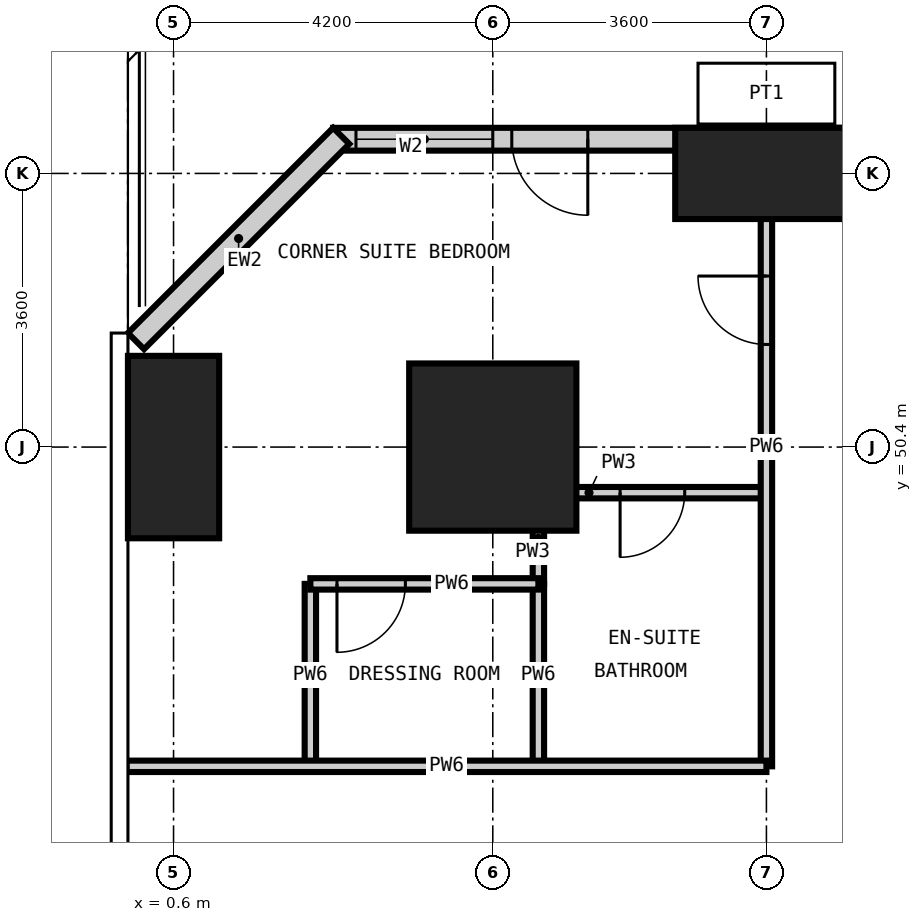
"""IFC4 building model, lengths in metres.
Left out: names, types, materials, properties, quantities, classifications, styles, units other than length and angle.
Written with IfcOpenShell. Run it as: python <this file> out.ifc"""

import sys

from ifc_helpers import new_model, si_unit, direction, frame, frame_2d, origin, origin_2d, place, context, subcontext, project, spatial, rectangle, extrude, element, fill, save


model = new_model("IFC4")
c1 = context("Model", 3, precision=1e-05, world=origin(), true_north=direction((0.0, 1.0)))
c2 = subcontext(c1, "Body", "Model", "MODEL_VIEW")
j1 = project(units=[si_unit("LENGTHUNIT", "METRE"), si_unit("PLANEANGLEUNIT", "RADIAN")], contexts=[c1])
p1 = place(None, origin())
s1 = spatial("IfcSite", under=j1, at=p1, CompositionType="ELEMENT")
p2 = place(p1, origin())
s2 = spatial("IfcBuilding", under=s1, at=p2, CompositionType="ELEMENT")
p3 = place(p2, frame((0.0, 0.0, 93.6)))
s3 = spatial("IfcBuildingStorey", under=s2, at=p3, CompositionType="ELEMENT", Elevation=93.6)
p4 = place(p3, frame((0.6, 50.4, -0.35), z_axis=(0.0, 0.0, 1.0), x_axis=(1.0, 0.0, 0.0)))
e1 = element("IfcColumn", 1, at=p4, inside=s3, PredefinedType="COLUMN", context=c2, shape_type="SweptSolid", body=[
    extrude(rectangle(XDim=1.2, YDim=2.4, at=origin_2d()), origin(), (0.0, 0.0, 1.0), 3.6),
])
p5 = place(p3, frame((4.8, 50.4, -0.35), z_axis=(0.0, 0.0, 1.0), x_axis=(1.0, 0.0, 0.0)))
e2 = element("IfcColumn", 2, at=p5, inside=s3, PredefinedType="COLUMN", context=c2, shape_type="SweptSolid", body=[
    extrude(rectangle(XDim=2.2, YDim=2.2, at=origin_2d()), origin(), (0.0, 0.0, 1.0), 3.6),
])
p6 = place(p3, frame((8.4, 54.0, -0.35), z_axis=(0.0, 0.0, 1.0), x_axis=(1.0, 0.0, 0.0)))
e3 = element("IfcColumn", 3, at=p6, inside=s3, PredefinedType="COLUMN", context=c2, shape_type="SweptSolid", body=[
    extrude(rectangle(XDim=2.4, YDim=1.2, at=origin_2d()), origin(), (0.0, 0.0, 1.0), 3.6),
])
p7 = place(p3, frame((51.9, 54.45, 0.0), z_axis=(0.0, 0.0, 1.0), x_axis=(-1.0, 0.0, 0.0)))
e4 = element("IfcWall", 4, at=p7, inside=s3, PredefinedType="SOLIDWALL", context=c2, shape_type="SweptSolid", body=[
    extrude(rectangle(XDim=49.2, YDim=0.3, at=frame_2d((24.6, 0.0))), origin(), (0.0, 0.0, 1.0), 3.25),
])
p8 = place(p7, frame((45.85, 0.0, 0.0)))
e5 = element("IfcOpeningElement", 5, at=p8, cuts=e4, PredefinedType="OPENING", context=c2, shape_type="SweptSolid", body=[
    extrude(rectangle(XDim=1.0, YDim=2.4, at=frame_2d((0.5, 1.2))), frame((0.0, 0.16, 0.0), z_axis=(0.0, -1.0, 0.0), x_axis=(1.0, 0.0, 0.0)), (0.0, 0.0, 1.0), 0.32),
])
p9 = place(p7, frame((47.1, 0.0, 0.6)))
e6 = element("IfcOpeningElement", 6, at=p9, cuts=e4, PredefinedType="OPENING", context=c2, shape_type="SweptSolid", body=[
    extrude(rectangle(XDim=1.8, YDim=2.1, at=frame_2d((0.9, 1.05))), frame((0.0, 0.16, 0.0), z_axis=(0.0, -1.0, 0.0), x_axis=(1.0, 0.0, 0.0)), (0.0, 0.0, 1.0), 0.32),
])
p10 = place(p7, frame((38.8, 0.0, 0.0)))
e7 = element("IfcOpeningElement", 7, at=p10, cuts=e4, PredefinedType="OPENING", context=c2, shape_type="SweptSolid", body=[
    extrude(rectangle(XDim=1.0, YDim=2.4, at=frame_2d((0.5, 1.2))), frame((0.0, 0.16, 0.0), z_axis=(0.0, -1.0, 0.0), x_axis=(1.0, 0.0, 0.0)), (0.0, 0.0, 1.0), 0.32),
])
p11 = place(p7, frame((40.4, 0.0, 0.6)))
e8 = element("IfcOpeningElement", 8, at=p11, cuts=e4, PredefinedType="OPENING", context=c2, shape_type="SweptSolid", body=[
    extrude(rectangle(XDim=1.8, YDim=2.1, at=frame_2d((0.9, 1.05))), frame((0.0, 0.16, 0.0), z_axis=(0.0, -1.0, 0.0), x_axis=(1.0, 0.0, 0.0)), (0.0, 0.0, 1.0), 0.32),
])
p12 = place(p7, frame((36.7, 0.0, 0.6)))
e9 = element("IfcOpeningElement", 9, at=p12, cuts=e4, PredefinedType="OPENING", context=c2, shape_type="SweptSolid", body=[
    extrude(rectangle(XDim=1.8, YDim=2.1, at=frame_2d((0.9, 1.05))), frame((0.0, 0.16, 0.0), z_axis=(0.0, -1.0, 0.0), x_axis=(1.0, 0.0, 0.0)), (0.0, 0.0, 1.0), 0.32),
])
p13 = place(p7, frame((30.4, 0.0, 0.0)))
e10 = element("IfcOpeningElement", 10, at=p13, cuts=e4, PredefinedType="OPENING", context=c2, shape_type="SweptSolid", body=[
    extrude(rectangle(XDim=1.0, YDim=2.4, at=frame_2d((0.5, 1.2))), frame((0.0, 0.16, 0.0), z_axis=(0.0, -1.0, 0.0), x_axis=(1.0, 0.0, 0.0)), (0.0, 0.0, 1.0), 0.32),
])
p14 = place(p7, frame((31.7, 0.0, 0.6)))
e11 = element("IfcOpeningElement", 11, at=p14, cuts=e4, PredefinedType="OPENING", context=c2, shape_type="SweptSolid", body=[
    extrude(rectangle(XDim=1.8, YDim=2.1, at=frame_2d((0.9, 1.05))), frame((0.0, 0.16, 0.0), z_axis=(0.0, -1.0, 0.0), x_axis=(1.0, 0.0, 0.0)), (0.0, 0.0, 1.0), 0.32),
])
p15 = place(p7, frame((28.0, 0.0, 0.6)))
e12 = element("IfcOpeningElement", 12, at=p15, cuts=e4, PredefinedType="OPENING", context=c2, shape_type="SweptSolid", body=[
    extrude(rectangle(XDim=1.8, YDim=2.1, at=frame_2d((0.9, 1.05))), frame((0.0, 0.16, 0.0), z_axis=(0.0, -1.0, 0.0), x_axis=(1.0, 0.0, 0.0)), (0.0, 0.0, 1.0), 0.32),
])
p16 = place(p7, frame((22.0, 0.0, 0.0)))
e13 = element("IfcOpeningElement", 13, at=p16, cuts=e4, PredefinedType="OPENING", context=c2, shape_type="SweptSolid", body=[
    extrude(rectangle(XDim=1.0, YDim=2.4, at=frame_2d((0.5, 1.2))), frame((0.0, 0.16, 0.0), z_axis=(0.0, -1.0, 0.0), x_axis=(1.0, 0.0, 0.0)), (0.0, 0.0, 1.0), 0.32),
])
p17 = place(p7, frame((23.6, 0.0, 0.6)))
e14 = element("IfcOpeningElement", 14, at=p17, cuts=e4, PredefinedType="OPENING", context=c2, shape_type="SweptSolid", body=[
    extrude(rectangle(XDim=1.8, YDim=2.1, at=frame_2d((0.9, 1.05))), frame((0.0, 0.16, 0.0), z_axis=(0.0, -1.0, 0.0), x_axis=(1.0, 0.0, 0.0)), (0.0, 0.0, 1.0), 0.32),
])
p18 = place(p7, frame((19.6, 0.0, 0.6)))
e15 = element("IfcOpeningElement", 15, at=p18, cuts=e4, PredefinedType="OPENING", context=c2, shape_type="SweptSolid", body=[
    extrude(rectangle(XDim=1.8, YDim=2.1, at=frame_2d((0.9, 1.05))), frame((0.0, 0.16, 0.0), z_axis=(0.0, -1.0, 0.0), x_axis=(1.0, 0.0, 0.0)), (0.0, 0.0, 1.0), 0.32),
])
p19 = place(p7, frame((13.6, 0.0, 0.0)))
e16 = element("IfcOpeningElement", 16, at=p19, cuts=e4, PredefinedType="OPENING", context=c2, shape_type="SweptSolid", body=[
    extrude(rectangle(XDim=1.0, YDim=2.4, at=frame_2d((0.5, 1.2))), frame((0.0, 0.16, 0.0), z_axis=(0.0, -1.0, 0.0), x_axis=(1.0, 0.0, 0.0)), (0.0, 0.0, 1.0), 0.32),
])
p20 = place(p7, frame((15.2, 0.0, 0.6)))
e17 = element("IfcOpeningElement", 17, at=p20, cuts=e4, PredefinedType="OPENING", context=c2, shape_type="SweptSolid", body=[
    extrude(rectangle(XDim=1.8, YDim=2.1, at=frame_2d((0.9, 1.05))), frame((0.0, 0.16, 0.0), z_axis=(0.0, -1.0, 0.0), x_axis=(1.0, 0.0, 0.0)), (0.0, 0.0, 1.0), 0.32),
])
p21 = place(p7, frame((11.5, 0.0, 0.6)))
e18 = element("IfcOpeningElement", 18, at=p21, cuts=e4, PredefinedType="OPENING", context=c2, shape_type="SweptSolid", body=[
    extrude(rectangle(XDim=1.8, YDim=2.1, at=frame_2d((0.9, 1.05))), frame((0.0, 0.16, 0.0), z_axis=(0.0, -1.0, 0.0), x_axis=(1.0, 0.0, 0.0)), (0.0, 0.0, 1.0), 0.32),
])
p22 = place(p7, frame((7.3, 0.0, 0.0)))
e19 = element("IfcOpeningElement", 19, at=p22, cuts=e4, PredefinedType="OPENING", context=c2, shape_type="SweptSolid", body=[
    extrude(rectangle(XDim=1.0, YDim=2.4, at=frame_2d((0.5, 1.2))), frame((0.0, 0.16, 0.0), z_axis=(0.0, -1.0, 0.0), x_axis=(1.0, 0.0, 0.0)), (0.0, 0.0, 1.0), 0.32),
])
p23 = place(p7, frame((2.75, 0.0, 0.0)))
e20 = element("IfcOpeningElement", 20, at=p23, cuts=e4, PredefinedType="OPENING", context=c2, shape_type="SweptSolid", body=[
    extrude(rectangle(XDim=1.0, YDim=2.4, at=frame_2d((0.5, 1.2))), frame((0.0, 0.16, 0.0), z_axis=(0.0, -1.0, 0.0), x_axis=(1.0, 0.0, 0.0)), (0.0, 0.0, 1.0), 0.32),
])
p24 = place(p3, frame((2.806, 54.494, 0.0), z_axis=(0.0, 0.0, 1.0), x_axis=(-0.707106781187, -0.707106781187, 0.0)))
e21 = element("IfcWall", 21, at=p24, inside=s3, PredefinedType="SOLIDWALL", context=c2, shape_type="SweptSolid", body=[
    extrude(rectangle(XDim=3.818, YDim=0.3, at=frame_2d((1.909, 0.0))), origin(), (0.0, 0.0, 1.0), 3.25),
])
p25 = place(p3, frame((5.4, 48.6, 0.0), z_axis=(0.0, 0.0, 1.0), x_axis=(0.0, 1.0, 0.0)))
e22 = element("IfcWall", 22, at=p25, inside=s3, PredefinedType="PARTITIONING", context=c2, shape_type="SweptSolid", body=[
    extrude(rectangle(XDim=1.2, YDim=0.15, at=frame_2d((0.6, 0.0))), origin(), (0.0, 0.0, 1.0), 3.25),
])
p26 = place(p3, frame((5.4, 49.8, 0.0), z_axis=(0.0, 0.0, 1.0), x_axis=(1.0, 0.0, 0.0)))
e23 = element("IfcWall", 23, at=p26, inside=s3, PredefinedType="PARTITIONING", context=c2, shape_type="SweptSolid", body=[
    extrude(rectangle(XDim=3.0, YDim=0.15, at=frame_2d((1.5, 0.0))), origin(), (0.0, 0.0, 1.0), 3.25),
])
p27 = place(p26, frame((1.075, 0.0, 0.0)))
e24 = element("IfcOpeningElement", 24, at=p27, cuts=e23, PredefinedType="OPENING", context=c2, shape_type="SweptSolid", body=[
    extrude(rectangle(XDim=0.85, YDim=2.1, at=frame_2d((0.425, 1.05))), frame((0.0, 0.085, 0.0), z_axis=(0.0, -1.0, 0.0), x_axis=(1.0, 0.0, 0.0)), (0.0, 0.0, 1.0), 0.17),
])
for number, where, z_axis, x_axis in (
    (25, (2.4, 46.2, 0.0), (0.0, 0.0, 1.0), (0.0, 1.0, 0.0)),
    (26, (5.4, 46.2, 0.0), (0.0, 0.0, 1.0), (0.0, 1.0, 0.0)),
):
    element("IfcWall", number, at=place(p3, frame(where, z_axis=z_axis, x_axis=x_axis)), inside=s3, PredefinedType="PARTITIONING", context=c2, shape_type="SweptSolid", body=[
        extrude(rectangle(XDim=2.4, YDim=0.15, at=frame_2d((1.2, 0.0))), origin(), (0.0, 0.0, 1.0), 3.25),
    ])
p28 = place(p3, frame((8.4, 46.2, 0.0), z_axis=(0.0, 0.0, 1.0), x_axis=(0.0, 1.0, 0.0)))
e27 = element("IfcWall", 27, at=p28, inside=s3, PredefinedType="PARTITIONING", context=c2, shape_type="SweptSolid", body=[
    extrude(rectangle(XDim=8.4, YDim=0.15, at=frame_2d((4.2, 0.0))), origin(), (0.0, 0.0, 1.0), 3.25),
])
p29 = place(p28, frame((5.55, 0.0, 0.0)))
e28 = element("IfcOpeningElement", 28, at=p29, cuts=e27, PredefinedType="OPENING", context=c2, shape_type="SweptSolid", body=[
    extrude(rectangle(XDim=0.9, YDim=2.1, at=frame_2d((0.45, 1.05))), frame((0.0, 0.085, 0.0), z_axis=(0.0, -1.0, 0.0), x_axis=(1.0, 0.0, 0.0)), (0.0, 0.0, 1.0), 0.17),
])
p30 = place(p3, frame((-0.018, 46.2, 0.0), z_axis=(0.0, 0.0, 1.0), x_axis=(1.0, 0.0, 0.0)))
e29 = element("IfcWall", 29, at=p30, inside=s3, PredefinedType="PARTITIONING", context=c2, shape_type="SweptSolid", body=[
    extrude(rectangle(XDim=8.418, YDim=0.15, at=frame_2d((4.209, 0.0))), origin(), (0.0, 0.0, 1.0), 3.25),
])
p31 = place(p3, frame((2.4, 48.6, 0.0), z_axis=(0.0, 0.0, 1.0), x_axis=(1.0, 0.0, 0.0)))
e30 = element("IfcWall", 30, at=p31, inside=s3, PredefinedType="PARTITIONING", context=c2, shape_type="SweptSolid", body=[
    extrude(rectangle(XDim=3.0, YDim=0.15, at=frame_2d((1.5, 0.0))), origin(), (0.0, 0.0, 1.0), 3.25),
])
p32 = place(p31, frame((0.35, 0.0, 0.0)))
e31 = element("IfcOpeningElement", 31, at=p32, cuts=e30, PredefinedType="OPENING", context=c2, shape_type="SweptSolid", body=[
    extrude(rectangle(XDim=0.9, YDim=2.1, at=frame_2d((0.45, 1.05))), frame((0.0, 0.085, 0.0), z_axis=(0.0, -1.0, 0.0), x_axis=(1.0, 0.0, 0.0)), (0.0, 0.0, 1.0), 0.17),
])
p33 = place(p8, origin())
e32 = element("IfcDoor", 32, at=p33, inside=s3, OperationType="SINGLE_SWING_LEFT", PredefinedType="DOOR", context=c2, shape_type="SweptSolid", body=[
    extrude(rectangle(XDim=1.0, YDim=2.4, at=frame_2d((0.5, 1.2))), frame((0.0, 0.025, 0.0), z_axis=(0.0, -1.0, 0.0), x_axis=(1.0, 0.0, 0.0)), (0.0, 0.0, 1.0), 0.05),
])
fill(e5, e32)
p34 = place(p9, origin())
e33 = element("IfcWindow", 33, at=p34, inside=s3, PartitioningType="SINGLE_PANEL", PredefinedType="WINDOW", context=c2, shape_type="SweptSolid", body=[
    extrude(rectangle(XDim=1.8, YDim=2.1, at=frame_2d((0.9, 1.05))), frame((0.0, 0.03, 0.0), z_axis=(0.0, -1.0, 0.0), x_axis=(1.0, 0.0, 0.0)), (0.0, 0.0, 1.0), 0.06),
])
fill(e6, e33)
p35 = place(p29, origin())
e34 = element("IfcDoor", 34, at=p35, inside=s3, OperationType="SINGLE_SWING_RIGHT", PredefinedType="DOOR", context=c2, shape_type="SweptSolid", body=[
    extrude(rectangle(XDim=0.9, YDim=2.1, at=frame_2d((0.45, 1.05))), frame((0.0, 0.025, 0.0), z_axis=(0.0, -1.0, 0.0), x_axis=(1.0, 0.0, 0.0)), (0.0, 0.0, 1.0), 0.05),
])
fill(e28, e34)
p36 = place(p27, frame((0.85, 0.0, 0.0), z_axis=(0.0, 0.0, 1.0), x_axis=(-1.0, 0.0, 0.0)))
e35 = element("IfcDoor", 35, at=p36, inside=s3, OperationType="SINGLE_SWING_RIGHT", PredefinedType="DOOR", context=c2, shape_type="SweptSolid", body=[
    extrude(rectangle(XDim=0.85, YDim=2.1, at=frame_2d((0.425, 1.05))), frame((0.0, 0.025, 0.0), z_axis=(0.0, -1.0, 0.0), x_axis=(1.0, 0.0, 0.0)), (0.0, 0.0, 1.0), 0.05),
])
fill(e24, e35)
p37 = place(p32, frame((0.9, 0.0, 0.0), z_axis=(0.0, 0.0, 1.0), x_axis=(-1.0, 0.0, 0.0)))
e36 = element("IfcDoor", 36, at=p37, inside=s3, OperationType="SINGLE_SWING_RIGHT", PredefinedType="DOOR", context=c2, shape_type="SweptSolid", body=[
    extrude(rectangle(XDim=0.9, YDim=2.1, at=frame_2d((0.45, 1.05))), frame((0.0, 0.025, 0.0), z_axis=(0.0, -1.0, 0.0), x_axis=(1.0, 0.0, 0.0)), (0.0, 0.0, 1.0), 0.05),
])
fill(e31, e36)
save(model, sys.argv[1])
